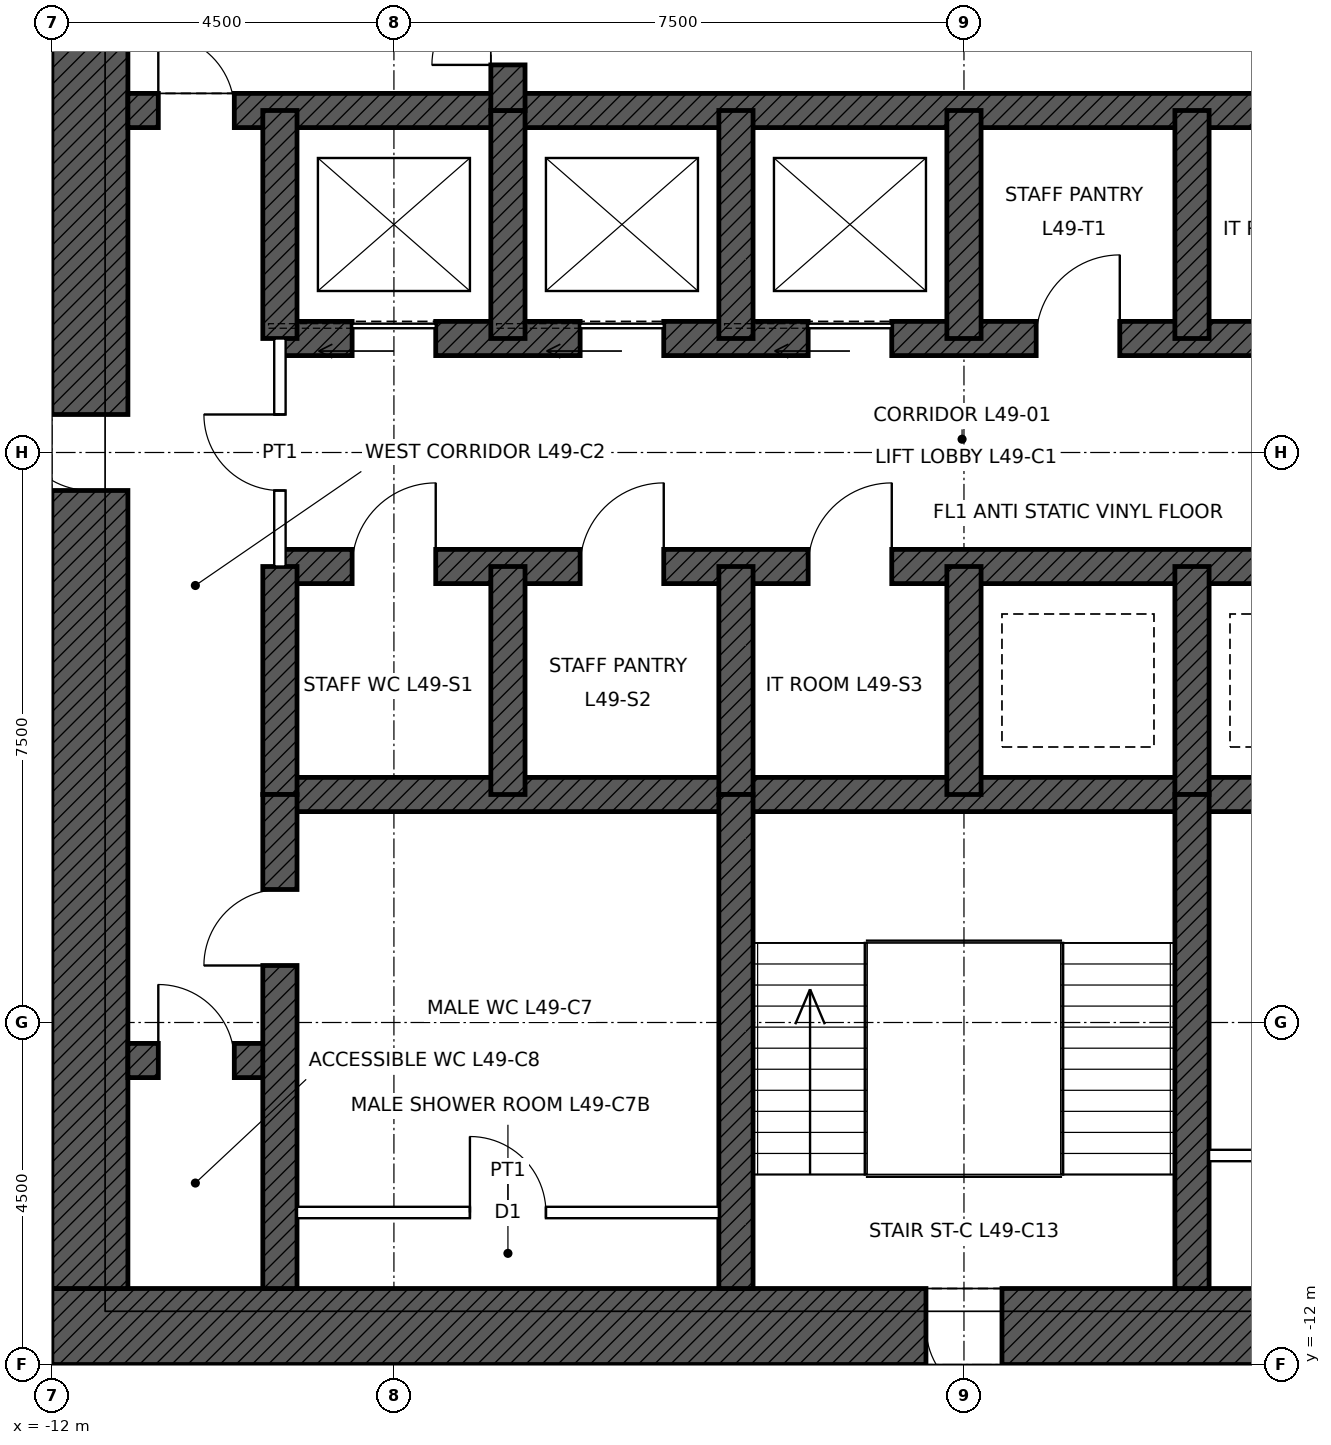
"""IFC4 building model, lengths in metres.
Left out: names, types, materials, properties, quantities, classifications, styles, units other than length and angle.
Written with IfcOpenShell. Run it as: python <this file> out.ifc"""

import sys

from ifc_helpers import new_model, si_unit, direction, frame, frame_2d, origin, place, context, subcontext, project, spatial, rectangle, extrude, element, fill, save


model = new_model("IFC4")
c1 = context("Model", 3, precision=1e-05, world=origin(), true_north=direction((0.0, 1.0)))
c2 = subcontext(c1, "Body", "Model", "MODEL_VIEW")
j1 = project(units=[si_unit("LENGTHUNIT", "METRE"), si_unit("PLANEANGLEUNIT", "RADIAN")], contexts=[c1])
p1 = place(None, origin())
s1 = spatial("IfcSite", under=j1, at=p1, CompositionType="ELEMENT")
p2 = place(p1, origin())
s2 = spatial("IfcBuilding", under=s1, at=p2, CompositionType="ELEMENT")
p3 = place(p2, frame((0.0, 0.0, 229.9)))
s3 = spatial("IfcBuildingStorey", under=s2, at=p3, CompositionType="ELEMENT", Elevation=229.9)
p4 = place(p3, frame((12.0, -11.5, 0.0), z_axis=(0.0, 0.0, 1.0), x_axis=(-1.0, 0.0, 0.0)))
e1 = element("IfcWall", 1, at=p4, inside=s3, PredefinedType="SHEAR", context=c2, shape_type="SweptSolid", body=[
    extrude(rectangle(XDim=24.0, YDim=1.0, at=frame_2d((12.0, 0.0))), origin(), (0.0, 0.0, 1.0), 4.0),
])
p5 = place(p4, frame((11.5, 0.0, 0.0)))
e2 = element("IfcOpeningElement", 2, at=p5, cuts=e1, PredefinedType="OPENING", context=c2, shape_type="SweptSolid", body=[
    extrude(rectangle(XDim=1.0, YDim=2.1, at=frame_2d((0.5, 1.05))), frame((0.0, 0.51, 0.0), z_axis=(0.0, -1.0, 0.0), x_axis=(1.0, 0.0, 0.0)), (0.0, 0.0, 1.0), 1.02),
])
p6 = place(p4, frame((1.0, 0.0, 0.0)))
e3 = element("IfcOpeningElement", 3, at=p6, cuts=e1, PredefinedType="OPENING", context=c2, shape_type="SweptSolid", body=[
    extrude(rectangle(XDim=1.0, YDim=2.4, at=frame_2d((0.5, 1.2))), frame((0.0, 0.51, 0.0), z_axis=(0.0, -1.0, 0.0), x_axis=(1.0, 0.0, 0.0)), (0.0, 0.0, 1.0), 1.02),
])
p7 = place(p3, frame((-11.5, -11.0, 0.0), z_axis=(0.0, 0.0, 1.0), x_axis=(0.0, 1.0, 0.0)))
e4 = element("IfcWall", 4, at=p7, inside=s3, PredefinedType="SHEAR", context=c2, shape_type="SweptSolid", body=[
    extrude(rectangle(XDim=22.0, YDim=1.0, at=frame_2d((11.0, 0.0))), origin(), (0.0, 0.0, 1.0), 4.0),
])
p8 = place(p7, frame((10.5, 0.0, 0.0)))
e5 = element("IfcOpeningElement", 5, at=p8, cuts=e4, PredefinedType="OPENING", context=c2, shape_type="SweptSolid", body=[
    extrude(rectangle(XDim=1.0, YDim=2.4, at=frame_2d((0.5, 1.2))), frame((0.0, 0.51, 0.0), z_axis=(0.0, -1.0, 0.0), x_axis=(1.0, 0.0, 0.0)), (0.0, 0.0, 1.0), 1.02),
])
p9 = place(p3, frame((-11.0, 4.5, 0.0), z_axis=(0.0, 0.0, 1.0), x_axis=(1.0, 0.0, 0.0)))
e6 = element("IfcWall", 6, at=p9, inside=s3, PredefinedType="SHEAR", context=c2, shape_type="SweptSolid", body=[
    extrude(rectangle(XDim=22.0, YDim=0.45, at=frame_2d((11.0, 0.0))), origin(), (0.0, 0.0, 1.0), 4.0),
])
p10 = place(p9, frame((0.4, 0.0, 0.0)))
e7 = element("IfcOpeningElement", 7, at=p10, cuts=e6, PredefinedType="OPENING", context=c2, shape_type="SweptSolid", body=[
    extrude(rectangle(XDim=1.0, YDim=2.1, at=frame_2d((0.5, 1.05))), frame((0.0, 0.235, 0.0), z_axis=(0.0, -1.0, 0.0), x_axis=(1.0, 0.0, 0.0)), (0.0, 0.0, 1.0), 0.47),
])
p11 = place(p9, frame((20.6, 0.0, 0.0)))
e8 = element("IfcOpeningElement", 8, at=p11, cuts=e6, PredefinedType="OPENING", context=c2, shape_type="SweptSolid", body=[
    extrude(rectangle(XDim=1.0, YDim=2.1, at=frame_2d((0.5, 1.05))), frame((0.0, 0.235, 0.0), z_axis=(0.0, -1.0, 0.0), x_axis=(1.0, 0.0, 0.0)), (0.0, 0.0, 1.0), 0.47),
])
p12 = place(p3, frame((-9.0, 1.5, 0.0), z_axis=(0.0, 0.0, 1.0), x_axis=(1.0, 0.0, 0.0)))
e9 = element("IfcWall", 9, at=p12, inside=s3, PredefinedType="SHEAR", context=c2, shape_type="SweptSolid", body=[
    extrude(rectangle(XDim=18.0, YDim=0.45, at=frame_2d((9.0, 0.0))), origin(), (0.0, 0.0, 1.0), 4.0),
])
p13 = place(p12, frame((0.95, 0.0, 0.0)))
e10 = element("IfcOpeningElement", 10, at=p13, cuts=e9, PredefinedType="OPENING", context=c2, shape_type="SweptSolid", body=[
    extrude(rectangle(XDim=1.1, YDim=2.1, at=frame_2d((0.55, 1.05))), frame((0.0, 0.235, 0.0), z_axis=(0.0, -1.0, 0.0), x_axis=(1.0, 0.0, 0.0)), (0.0, 0.0, 1.0), 0.47),
])
p14 = place(p12, frame((3.95, 0.0, 0.0)))
e11 = element("IfcOpeningElement", 11, at=p14, cuts=e9, PredefinedType="OPENING", context=c2, shape_type="SweptSolid", body=[
    extrude(rectangle(XDim=1.1, YDim=2.1, at=frame_2d((0.55, 1.05))), frame((0.0, 0.235, 0.0), z_axis=(0.0, -1.0, 0.0), x_axis=(1.0, 0.0, 0.0)), (0.0, 0.0, 1.0), 0.47),
])
p15 = place(p12, frame((6.95, 0.0, 0.0)))
e12 = element("IfcOpeningElement", 12, at=p15, cuts=e9, PredefinedType="OPENING", context=c2, shape_type="SweptSolid", body=[
    extrude(rectangle(XDim=1.1, YDim=2.1, at=frame_2d((0.55, 1.05))), frame((0.0, 0.235, 0.0), z_axis=(0.0, -1.0, 0.0), x_axis=(1.0, 0.0, 0.0)), (0.0, 0.0, 1.0), 0.47),
])
p16 = place(p12, frame((9.95, 0.0, 0.0)))
e13 = element("IfcOpeningElement", 13, at=p16, cuts=e9, PredefinedType="OPENING", context=c2, shape_type="SweptSolid", body=[
    extrude(rectangle(XDim=1.1, YDim=2.1, at=frame_2d((0.55, 1.05))), frame((0.0, 0.235, 0.0), z_axis=(0.0, -1.0, 0.0), x_axis=(1.0, 0.0, 0.0)), (0.0, 0.0, 1.0), 0.47),
])
p17 = place(p12, frame((12.95, 0.0, 0.0)))
e14 = element("IfcOpeningElement", 14, at=p17, cuts=e9, PredefinedType="OPENING", context=c2, shape_type="SweptSolid", body=[
    extrude(rectangle(XDim=1.1, YDim=2.1, at=frame_2d((0.55, 1.05))), frame((0.0, 0.235, 0.0), z_axis=(0.0, -1.0, 0.0), x_axis=(1.0, 0.0, 0.0)), (0.0, 0.0, 1.0), 0.47),
])
p18 = place(p12, frame((15.95, 0.0, 0.0)))
e15 = element("IfcOpeningElement", 15, at=p18, cuts=e9, PredefinedType="OPENING", context=c2, shape_type="SweptSolid", body=[
    extrude(rectangle(XDim=1.1, YDim=2.1, at=frame_2d((0.55, 1.05))), frame((0.0, 0.235, 0.0), z_axis=(0.0, -1.0, 0.0), x_axis=(1.0, 0.0, 0.0)), (0.0, 0.0, 1.0), 0.47),
])
p19 = place(p3, frame((-9.0, -1.5, 0.0), z_axis=(0.0, 0.0, 1.0), x_axis=(1.0, 0.0, 0.0)))
e16 = element("IfcWall", 16, at=p19, inside=s3, PredefinedType="SHEAR", context=c2, shape_type="SweptSolid", body=[
    extrude(rectangle(XDim=18.0, YDim=0.45, at=frame_2d((9.0, 0.0))), origin(), (0.0, 0.0, 1.0), 4.0),
])
p20 = place(p19, frame((0.95, 0.0, 0.0)))
e17 = element("IfcOpeningElement", 17, at=p20, cuts=e16, PredefinedType="OPENING", context=c2, shape_type="SweptSolid", body=[
    extrude(rectangle(XDim=1.1, YDim=2.1, at=frame_2d((0.55, 1.05))), frame((0.0, 0.235, 0.0), z_axis=(0.0, -1.0, 0.0), x_axis=(1.0, 0.0, 0.0)), (0.0, 0.0, 1.0), 0.47),
])
p21 = place(p19, frame((3.95, 0.0, 0.0)))
e18 = element("IfcOpeningElement", 18, at=p21, cuts=e16, PredefinedType="OPENING", context=c2, shape_type="SweptSolid", body=[
    extrude(rectangle(XDim=1.1, YDim=2.1, at=frame_2d((0.55, 1.05))), frame((0.0, 0.235, 0.0), z_axis=(0.0, -1.0, 0.0), x_axis=(1.0, 0.0, 0.0)), (0.0, 0.0, 1.0), 0.47),
])
p22 = place(p19, frame((6.95, 0.0, 0.0)))
e19 = element("IfcOpeningElement", 19, at=p22, cuts=e16, PredefinedType="OPENING", context=c2, shape_type="SweptSolid", body=[
    extrude(rectangle(XDim=1.1, YDim=2.1, at=frame_2d((0.55, 1.05))), frame((0.0, 0.235, 0.0), z_axis=(0.0, -1.0, 0.0), x_axis=(1.0, 0.0, 0.0)), (0.0, 0.0, 1.0), 0.47),
])
p23 = place(p3, frame((-9.0, -4.5, 0.0), z_axis=(0.0, 0.0, 1.0), x_axis=(1.0, 0.0, 0.0)))
e20 = element("IfcWall", 20, at=p23, inside=s3, PredefinedType="SHEAR", context=c2, shape_type="SweptSolid", body=[
    extrude(rectangle(XDim=18.0, YDim=0.45, at=frame_2d((9.0, 0.0))), origin(), (0.0, 0.0, 1.0), 4.0),
])
p24 = place(p3, frame((-11.0, -8.0, 0.0), z_axis=(0.0, 0.0, 1.0), x_axis=(1.0, 0.0, 0.0)))
e21 = element("IfcWall", 21, at=p24, inside=s3, PredefinedType="SHEAR", context=c2, shape_type="SweptSolid", body=[
    extrude(rectangle(XDim=2.0, YDim=0.45, at=frame_2d((1.0, 0.0))), origin(), (0.0, 0.0, 1.0), 4.0),
])
p25 = place(p24, frame((0.4, 0.0, 0.0)))
e22 = element("IfcOpeningElement", 22, at=p25, cuts=e21, PredefinedType="OPENING", context=c2, shape_type="SweptSolid", body=[
    extrude(rectangle(XDim=1.0, YDim=2.1, at=frame_2d((0.5, 1.05))), frame((0.0, 0.235, 0.0), z_axis=(0.0, -1.0, 0.0), x_axis=(1.0, 0.0, 0.0)), (0.0, 0.0, 1.0), 0.47),
])
for number, where, z_axis, x_axis in (
    (23, (-9.0, 1.5, 0.0), (0.0, 0.0, 1.0), (0.0, 1.0, 0.0)),
    (24, (-9.0, -4.5, 0.0), (0.0, 0.0, 1.0), (0.0, 1.0, 0.0)),
    (25, (-6.0, 1.5, 0.0), (0.0, 0.0, 1.0), (0.0, 1.0, 0.0)),
    (26, (-3.0, 1.5, 0.0), (0.0, 0.0, 1.0), (0.0, 1.0, 0.0)),
    (27, (0.0, 1.5, 0.0), (0.0, 0.0, 1.0), (0.0, 1.0, 0.0)),
    (28, (3.0, 1.5, 0.0), (0.0, 0.0, 1.0), (0.0, 1.0, 0.0)),
    (29, (-6.0, -4.5, 0.0), (0.0, 0.0, 1.0), (0.0, 1.0, 0.0)),
    (30, (-3.0, -4.5, 0.0), (0.0, 0.0, 1.0), (0.0, 1.0, 0.0)),
    (31, (0.0, -4.5, 0.0), (0.0, 0.0, 1.0), (0.0, 1.0, 0.0)),
    (32, (3.0, -4.5, 0.0), (0.0, 0.0, 1.0), (0.0, 1.0, 0.0)),
):
    element("IfcWall", number, at=place(p3, frame(where, z_axis=z_axis, x_axis=x_axis)), inside=s3, PredefinedType="SHEAR", context=c2, shape_type="SweptSolid", body=[
        extrude(rectangle(XDim=3.0, YDim=0.45, at=frame_2d((1.5, 0.0))), origin(), (0.0, 0.0, 1.0), 4.0),
    ])
p26 = place(p3, frame((-6.0, 4.5, 0.0), z_axis=(0.0, 0.0, 1.0), x_axis=(0.0, 1.0, 0.0)))
e33 = element("IfcWall", 33, at=p26, inside=s3, PredefinedType="SHEAR", context=c2, shape_type="SweptSolid", body=[
    extrude(rectangle(XDim=6.5, YDim=0.45, at=frame_2d((3.25, 0.0))), origin(), (0.0, 0.0, 1.0), 4.0),
])
p27 = place(p26, frame((0.6, 0.0, 0.0)))
e34 = element("IfcOpeningElement", 34, at=p27, cuts=e33, PredefinedType="OPENING", context=c2, shape_type="SweptSolid", body=[
    extrude(rectangle(XDim=1.0, YDim=2.1, at=frame_2d((0.5, 1.05))), frame((0.0, 0.235, 0.0), z_axis=(0.0, -1.0, 0.0), x_axis=(1.0, 0.0, 0.0)), (0.0, 0.0, 1.0), 0.47),
])
p28 = place(p3, frame((-9.0, -11.0, 0.0), z_axis=(0.0, 0.0, 1.0), x_axis=(0.0, 1.0, 0.0)))
e35 = element("IfcWall", 35, at=p28, inside=s3, PredefinedType="SHEAR", context=c2, shape_type="SweptSolid", body=[
    extrude(rectangle(XDim=6.5, YDim=0.45, at=frame_2d((3.25, 0.0))), origin(), (0.0, 0.0, 1.0), 4.0),
])
p29 = place(p28, frame((4.25, 0.0, 0.0)))
e36 = element("IfcOpeningElement", 36, at=p29, cuts=e35, PredefinedType="OPENING", context=c2, shape_type="SweptSolid", body=[
    extrude(rectangle(XDim=1.0, YDim=2.1, at=frame_2d((0.5, 1.05))), frame((0.0, 0.235, 0.0), z_axis=(0.0, -1.0, 0.0), x_axis=(1.0, 0.0, 0.0)), (0.0, 0.0, 1.0), 0.47),
])
for number, where, z_axis, x_axis in (
    (37, (-3.0, -11.0, 0.0), (0.0, 0.0, 1.0), (0.0, 1.0, 0.0)),
    (38, (3.0, -11.0, 0.0), (0.0, 0.0, 1.0), (0.0, 1.0, 0.0)),
):
    element("IfcWall", number, at=place(p3, frame(where, z_axis=z_axis, x_axis=x_axis)), inside=s3, PredefinedType="SHEAR", context=c2, shape_type="SweptSolid", body=[
        extrude(rectangle(XDim=6.5, YDim=0.45, at=frame_2d((3.25, 0.0))), origin(), (0.0, 0.0, 1.0), 4.0),
    ])
p30 = place(p3, frame((-8.775, -10.0, 0.0), z_axis=(0.0, 0.0, 1.0), x_axis=(1.0, 0.0, 0.0)))
e39 = element("IfcWall", 39, at=p30, inside=s3, PredefinedType="PARTITIONING", context=c2, shape_type="SweptSolid", body=[
    extrude(rectangle(XDim=5.55, YDim=0.15, at=frame_2d((2.775, 0.0))), origin(), (0.0, 0.0, 1.0), 3.75),
])
p31 = place(p30, frame((2.275, 0.0, 0.0)))
e40 = element("IfcOpeningElement", 40, at=p31, cuts=e39, PredefinedType="OPENING", context=c2, shape_type="SweptSolid", body=[
    extrude(rectangle(XDim=1.0, YDim=2.1, at=frame_2d((0.5, 1.05))), frame((0.0, 0.085, 0.0), z_axis=(0.0, -1.0, 0.0), x_axis=(1.0, 0.0, 0.0)), (0.0, 0.0, 1.0), 0.17),
])
p32 = place(p3, frame((3.225, -9.25, 0.0), z_axis=(0.0, 0.0, 1.0), x_axis=(1.0, 0.0, 0.0)))
e41 = element("IfcWall", 41, at=p32, inside=s3, PredefinedType="PARTITIONING", context=c2, shape_type="SweptSolid", body=[
    extrude(rectangle(XDim=5.55, YDim=0.15, at=frame_2d((2.775, 0.0))), origin(), (0.0, 0.0, 1.0), 3.75),
])
p33 = place(p32, frame((2.275, 0.0, 0.0)))
e42 = element("IfcOpeningElement", 42, at=p33, cuts=e41, PredefinedType="OPENING", context=c2, shape_type="SweptSolid", body=[
    extrude(rectangle(XDim=1.0, YDim=2.1, at=frame_2d((0.5, 1.05))), frame((0.0, 0.085, 0.0), z_axis=(0.0, -1.0, 0.0), x_axis=(1.0, 0.0, 0.0)), (0.0, 0.0, 1.0), 0.17),
])
p34 = place(p3, frame((-9.0, -1.5, 0.0), z_axis=(0.0, 0.0, 1.0), x_axis=(0.0, 1.0, 0.0)))
e43 = element("IfcWall", 43, at=p34, inside=s3, PredefinedType="PARTITIONING", context=c2, shape_type="SweptSolid", body=[
    extrude(rectangle(XDim=3.0, YDim=0.15, at=frame_2d((1.5, 0.0))), origin(), (0.0, 0.0, 1.0), 3.75),
])
p35 = place(p34, frame((1.0, 0.0, 0.0)))
e44 = element("IfcOpeningElement", 44, at=p35, cuts=e43, PredefinedType="OPENING", context=c2, shape_type="SweptSolid", body=[
    extrude(rectangle(XDim=1.0, YDim=2.4, at=frame_2d((0.5, 1.2))), frame((0.0, 0.085, 0.0), z_axis=(0.0, -1.0, 0.0), x_axis=(1.0, 0.0, 0.0)), (0.0, 0.0, 1.0), 0.17),
])
p36 = place(p10, origin())
e45 = element("IfcDoor", 45, at=p36, inside=s3, OperationType="SINGLE_SWING_LEFT", PredefinedType="DOOR", context=c2, shape_type="SweptSolid", body=[
    extrude(rectangle(XDim=1.0, YDim=2.1, at=frame_2d((0.5, 1.05))), frame((0.0, 0.025, 0.0), z_axis=(0.0, -1.0, 0.0), x_axis=(1.0, 0.0, 0.0)), (0.0, 0.0, 1.0), 0.05),
])
fill(e7, e45)
p37 = place(p27, origin())
e46 = element("IfcDoor", 46, at=p37, inside=s3, OperationType="SINGLE_SWING_LEFT", PredefinedType="DOOR", context=c2, shape_type="SweptSolid", body=[
    extrude(rectangle(XDim=1.0, YDim=2.1, at=frame_2d((0.5, 1.05))), frame((0.0, 0.025, 0.0), z_axis=(0.0, -1.0, 0.0), x_axis=(1.0, 0.0, 0.0)), (0.0, 0.0, 1.0), 0.05),
])
fill(e34, e46)
p38 = place(p5, origin())
e47 = element("IfcDoor", 47, at=p38, inside=s3, OperationType="SINGLE_SWING_LEFT", PredefinedType="DOOR", context=c2, shape_type="SweptSolid", body=[
    extrude(rectangle(XDim=1.0, YDim=2.1, at=frame_2d((0.5, 1.05))), frame((0.0, 0.485, 0.0), z_axis=(0.0, -1.0, 0.0), x_axis=(1.0, 0.0, 0.0)), (0.0, 0.0, 1.0), 0.05),
])
fill(e2, e47)
p39 = place(p8, origin())
e48 = element("IfcDoor", 48, at=p39, inside=s3, OperationType="SINGLE_SWING_RIGHT", PredefinedType="DOOR", context=c2, shape_type="SweptSolid", body=[
    extrude(rectangle(XDim=1.0, YDim=2.4, at=frame_2d((0.5, 1.2))), frame((0.0, 0.485, 0.0), z_axis=(0.0, -1.0, 0.0), x_axis=(1.0, 0.0, 0.0)), (0.0, 0.0, 1.0), 0.05),
])
fill(e5, e48)
p40 = place(p29, origin())
e49 = element("IfcDoor", 49, at=p40, inside=s3, OperationType="SINGLE_SWING_LEFT", PredefinedType="DOOR", context=c2, shape_type="SweptSolid", body=[
    extrude(rectangle(XDim=1.0, YDim=2.1, at=frame_2d((0.5, 1.05))), frame((0.0, 0.025, 0.0), z_axis=(0.0, -1.0, 0.0), x_axis=(1.0, 0.0, 0.0)), (0.0, 0.0, 1.0), 0.05),
])
fill(e36, e49)
p41 = place(p25, origin())
e50 = element("IfcDoor", 50, at=p41, inside=s3, OperationType="SINGLE_SWING_LEFT", PredefinedType="DOOR", context=c2, shape_type="SweptSolid", body=[
    extrude(rectangle(XDim=1.0, YDim=2.1, at=frame_2d((0.5, 1.05))), frame((0.0, 0.025, 0.0), z_axis=(0.0, -1.0, 0.0), x_axis=(1.0, 0.0, 0.0)), (0.0, 0.0, 1.0), 0.05),
])
fill(e22, e50)
p42 = place(p13, origin())
e51 = element("IfcDoor", 51, at=p42, inside=s3, OperationType="SLIDING_TO_LEFT", PredefinedType="DOOR", context=c2, shape_type="SweptSolid", body=[
    extrude(rectangle(XDim=1.1, YDim=2.1, at=frame_2d((0.55, 1.05))), frame((0.0, 0.025, 0.0), z_axis=(0.0, -1.0, 0.0), x_axis=(1.0, 0.0, 0.0)), (0.0, 0.0, 1.0), 0.05),
])
fill(e10, e51)
p43 = place(p14, origin())
e52 = element("IfcDoor", 52, at=p43, inside=s3, OperationType="SLIDING_TO_LEFT", PredefinedType="DOOR", context=c2, shape_type="SweptSolid", body=[
    extrude(rectangle(XDim=1.1, YDim=2.1, at=frame_2d((0.55, 1.05))), frame((0.0, 0.025, 0.0), z_axis=(0.0, -1.0, 0.0), x_axis=(1.0, 0.0, 0.0)), (0.0, 0.0, 1.0), 0.05),
])
fill(e11, e52)
p44 = place(p15, origin())
e53 = element("IfcDoor", 53, at=p44, inside=s3, OperationType="SLIDING_TO_LEFT", PredefinedType="DOOR", context=c2, shape_type="SweptSolid", body=[
    extrude(rectangle(XDim=1.1, YDim=2.1, at=frame_2d((0.55, 1.05))), frame((0.0, 0.025, 0.0), z_axis=(0.0, -1.0, 0.0), x_axis=(1.0, 0.0, 0.0)), (0.0, 0.0, 1.0), 0.05),
])
fill(e12, e53)
p45 = place(p31, origin())
e54 = element("IfcDoor", 54, at=p45, inside=s3, OperationType="SINGLE_SWING_LEFT", PredefinedType="DOOR", context=c2, shape_type="SweptSolid", body=[
    extrude(rectangle(XDim=1.0, YDim=2.1, at=frame_2d((0.5, 1.05))), frame((0.0, 0.025, 0.0), z_axis=(0.0, -1.0, 0.0), x_axis=(1.0, 0.0, 0.0)), (0.0, 0.0, 1.0), 0.05),
])
fill(e40, e54)
p46 = place(p35, origin())
e55 = element("IfcDoor", 55, at=p46, inside=s3, OperationType="SINGLE_SWING_RIGHT", PredefinedType="DOOR", context=c2, shape_type="SweptSolid", body=[
    extrude(rectangle(XDim=1.0, YDim=2.4, at=frame_2d((0.5, 1.2))), frame((0.0, 0.025, 0.0), z_axis=(0.0, -1.0, 0.0), x_axis=(1.0, 0.0, 0.0)), (0.0, 0.0, 1.0), 0.05),
])
fill(e44, e55)
p47 = place(p16, origin())
e56 = element("IfcDoor", 56, at=p47, inside=s3, OperationType="SINGLE_SWING_RIGHT", PredefinedType="DOOR", context=c2, shape_type="SweptSolid", body=[
    extrude(rectangle(XDim=1.1, YDim=2.1, at=frame_2d((0.55, 1.05))), frame((0.0, 0.025, 0.0), z_axis=(0.0, -1.0, 0.0), x_axis=(1.0, 0.0, 0.0)), (0.0, 0.0, 1.0), 0.05),
])
fill(e13, e56)
p48 = place(p20, origin())
e57 = element("IfcDoor", 57, at=p48, inside=s3, OperationType="SINGLE_SWING_RIGHT", PredefinedType="DOOR", context=c2, shape_type="SweptSolid", body=[
    extrude(rectangle(XDim=1.1, YDim=2.1, at=frame_2d((0.55, 1.05))), frame((0.0, 0.025, 0.0), z_axis=(0.0, -1.0, 0.0), x_axis=(1.0, 0.0, 0.0)), (0.0, 0.0, 1.0), 0.05),
])
fill(e17, e57)
p49 = place(p21, origin())
e58 = element("IfcDoor", 58, at=p49, inside=s3, OperationType="SINGLE_SWING_RIGHT", PredefinedType="DOOR", context=c2, shape_type="SweptSolid", body=[
    extrude(rectangle(XDim=1.1, YDim=2.1, at=frame_2d((0.55, 1.05))), frame((0.0, 0.025, 0.0), z_axis=(0.0, -1.0, 0.0), x_axis=(1.0, 0.0, 0.0)), (0.0, 0.0, 1.0), 0.05),
])
fill(e18, e58)
p50 = place(p22, origin())
e59 = element("IfcDoor", 59, at=p50, inside=s3, OperationType="SINGLE_SWING_RIGHT", PredefinedType="DOOR", context=c2, shape_type="SweptSolid", body=[
    extrude(rectangle(XDim=1.1, YDim=2.1, at=frame_2d((0.55, 1.05))), frame((0.0, 0.025, 0.0), z_axis=(0.0, -1.0, 0.0), x_axis=(1.0, 0.0, 0.0)), (0.0, 0.0, 1.0), 0.05),
])
fill(e19, e59)
save(model, sys.argv[1])
